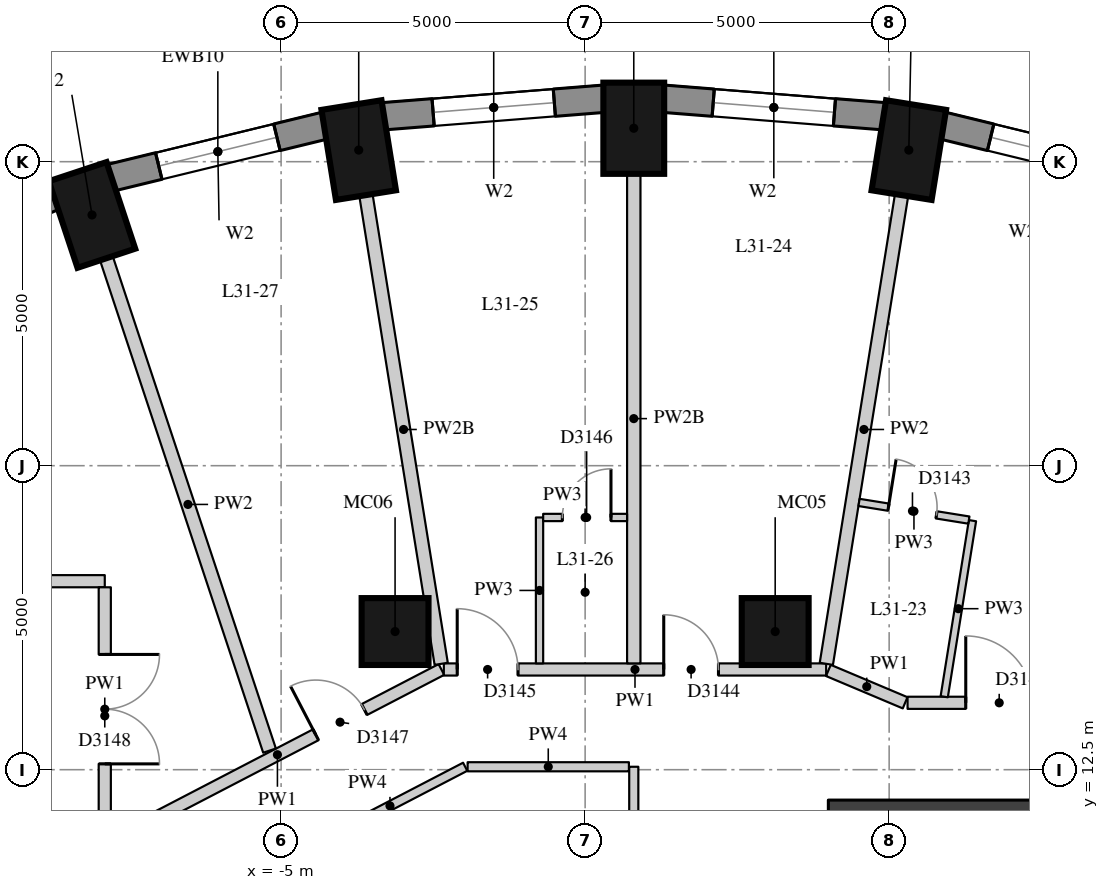
"""IFC4 building model, lengths in metres.
Left out: names, types, materials, properties, quantities, classifications, styles, units other than length and angle.
Written with IfcOpenShell. Run it as: python <this file> out.ifc"""

import sys

from ifc_helpers import new_model, si_unit, direction, frame, frame_2d, origin, origin_2d, place, context, subcontext, project, spatial, rectangle, extrude, element, fill, save


model = new_model("IFC4")
c1 = context("Model", 3, precision=1e-05, world=origin(), true_north=direction((0.0, 1.0)))
c2 = subcontext(c1, "Body", "Model", "MODEL_VIEW")
j1 = project(units=[si_unit("LENGTHUNIT", "METRE"), si_unit("PLANEANGLEUNIT", "RADIAN")], contexts=[c1])
p1 = place(None, origin())
s1 = spatial("IfcSite", under=j1, at=p1, CompositionType="ELEMENT")
p2 = place(p1, origin())
s2 = spatial("IfcBuilding", under=s1, at=p2, CompositionType="ELEMENT")
p3 = place(p2, frame((0.0, 0.0, 112.0)))
s3 = spatial("IfcBuildingStorey", under=s2, at=p3, CompositionType="ELEMENT", Elevation=112.0)
for number, where, z_axis, x_axis in (
    (1, (5.323, 22.691, 0.0), (0.0, 0.0, 1.0), (0.159, 0.987, 0.0)),
    (2, (0.8, 23.05, 0.0), (0.0, 0.0, 1.0), (0.0, 1.0, 0.0)),
    (3, (-3.724, 22.691, 0.0), (0.0, 0.0, 1.0), (-0.159, 0.987, 0.0)),
    (4, (-8.11, 21.624, 0.0), (0.0, 0.0, 1.0), (-0.315, 0.949, 0.0)),
):
    element("IfcColumn", number, at=place(p3, frame(where, z_axis=z_axis, x_axis=x_axis)), inside=s3, PredefinedType="COLUMN", context=c2, shape_type="SweptSolid", body=[
        extrude(rectangle(XDim=1.5, YDim=1.0, at=origin_2d()), origin(), (0.0, 0.0, 1.0), 3.3),
    ])
for number, where, z_axis, x_axis in (
    (5, (3.126, 14.772, 0.0), (0.0, 0.0, 1.0), (1.0, 0.0, 0.0)),
    (6, (-3.126, 14.772, 0.0), (0.0, 0.0, 1.0), (1.0, 0.0, 0.0)),
):
    element("IfcColumn", number, at=place(p3, frame(where, z_axis=z_axis, x_axis=x_axis)), inside=s3, PredefinedType="COLUMN", context=c2, shape_type="SweptSolid", body=[
        extrude(rectangle(XDim=1.1, YDim=1.1, at=origin_2d()), origin(), (0.0, 0.0, 1.0), 3.3),
    ])
p4 = place(p3, frame((9.406, 22.235, 0.0), z_axis=(0.0, 0.0, 1.0), x_axis=(-0.971667603162, 0.236351579148, 0.0)))
e7 = element("IfcWall", 7, at=p4, inside=s3, PredefinedType="SOLIDWALL", context=c2, shape_type="SweptSolid", body=[
    extrude(rectangle(XDim=3.635, YDim=0.45, at=frame_2d((1.817, 0.0))), origin(), (0.0, 0.0, 1.0), 3.02),
])
p5 = place(p4, frame((0.817, 0.0, 0.4)))
e8 = element("IfcOpeningElement", 8, at=p5, cuts=e7, PredefinedType="OPENING", context=c2, shape_type="SweptSolid", body=[
    extrude(rectangle(XDim=2.0, YDim=1.75, at=frame_2d((1.0, 0.875))), frame((0.0, 0.235, 0.0), z_axis=(0.0, -1.0, 0.0), x_axis=(1.0, 0.0, 0.0)), (0.0, 0.0, 1.0), 0.47),
])
p6 = place(p3, frame((4.927, 23.247, 0.0), z_axis=(0.0, 0.0, 1.0), x_axis=(-0.996862216754, 0.079156306178, 0.0)))
e9 = element("IfcWall", 9, at=p6, inside=s3, PredefinedType="SOLIDWALL", context=c2, shape_type="SweptSolid", body=[
    extrude(rectangle(XDim=3.658, YDim=0.45, at=frame_2d((1.829, 0.0))), origin(), (0.0, 0.0, 1.0), 3.02),
])
p7 = place(p6, frame((0.829, 0.0, 0.4)))
e10 = element("IfcOpeningElement", 10, at=p7, cuts=e9, PredefinedType="OPENING", context=c2, shape_type="SweptSolid", body=[
    extrude(rectangle(XDim=2.0, YDim=1.75, at=frame_2d((1.0, 0.875))), frame((0.0, 0.235, 0.0), z_axis=(0.0, -1.0, 0.0), x_axis=(1.0, 0.0, 0.0)), (0.0, 0.0, 1.0), 0.47),
])
p8 = place(p3, frame((0.32, 23.536, 0.0), z_axis=(0.0, 0.0, 1.0), x_axis=(-0.996862216754, -0.079156306178, 0.0)))
e11 = element("IfcWall", 11, at=p8, inside=s3, PredefinedType="SOLIDWALL", context=c2, shape_type="SweptSolid", body=[
    extrude(rectangle(XDim=3.658, YDim=0.45, at=frame_2d((1.829, 0.0))), origin(), (0.0, 0.0, 1.0), 3.02),
])
p9 = place(p8, frame((0.829, 0.0, 0.4)))
e12 = element("IfcOpeningElement", 12, at=p9, cuts=e11, PredefinedType="OPENING", context=c2, shape_type="SweptSolid", body=[
    extrude(rectangle(XDim=2.0, YDim=1.75, at=frame_2d((1.0, 0.875))), frame((0.0, 0.235, 0.0), z_axis=(0.0, -1.0, 0.0), x_axis=(1.0, 0.0, 0.0)), (0.0, 0.0, 1.0), 0.47),
])
p10 = place(p3, frame((-4.275, 23.094, 0.0), z_axis=(0.0, 0.0, 1.0), x_axis=(-0.971667603162, -0.236351579148, 0.0)))
e13 = element("IfcWall", 13, at=p10, inside=s3, PredefinedType="SOLIDWALL", context=c2, shape_type="SweptSolid", body=[
    extrude(rectangle(XDim=3.635, YDim=0.45, at=frame_2d((1.817, 0.0))), origin(), (0.0, 0.0, 1.0), 3.02),
])
p11 = place(p10, frame((0.817, 0.0, 0.4)))
e14 = element("IfcOpeningElement", 14, at=p11, cuts=e13, PredefinedType="OPENING", context=c2, shape_type="SweptSolid", body=[
    extrude(rectangle(XDim=2.0, YDim=1.75, at=frame_2d((1.0, 0.875))), frame((0.0, 0.235, 0.0), z_axis=(0.0, -1.0, 0.0), x_axis=(1.0, 0.0, 0.0)), (0.0, 0.0, 1.0), 0.47),
])
p12 = place(p3, frame((-8.718, 21.934, 0.0), z_axis=(0.0, 0.0, 1.0), x_axis=(-0.920879975612, -0.389846213932, 0.0)))
e15 = element("IfcWall", 15, at=p12, inside=s3, PredefinedType="SOLIDWALL", context=c2, shape_type="SweptSolid", body=[
    extrude(rectangle(XDim=3.592, YDim=0.45, at=frame_2d((1.796, 0.0))), origin(), (0.0, 0.0, 1.0), 3.02),
])
p13 = place(p12, frame((0.796, 0.0, 0.4)))
e16 = element("IfcOpeningElement", 16, at=p13, cuts=e15, PredefinedType="OPENING", context=c2, shape_type="SweptSolid", body=[
    extrude(rectangle(XDim=2.0, YDim=1.75, at=frame_2d((1.0, 0.875))), frame((0.0, 0.235, 0.0), z_axis=(0.0, -1.0, 0.0), x_axis=(1.0, 0.0, 0.0)), (0.0, 0.0, 1.0), 0.47),
])
p14 = place(p3, frame((4.0, 11.55, 0.0), z_axis=(0.0, 0.0, 1.0), x_axis=(1.0, 0.0, 0.0)))
e17 = element("IfcWall", 17, at=p14, inside=s3, PredefinedType="SHEAR", context=c2, shape_type="SweptSolid", body=[
    extrude(rectangle(XDim=15.2, YDim=0.9, at=frame_2d((7.6, 0.0))), origin(), (0.0, 0.0, 1.0), 3.02),
])
p15 = place(p3, frame((-10.509, 15.6, 0.0), z_axis=(0.0, 0.0, 1.0), x_axis=(1.0, 0.0, 0.0)))
e18 = element("IfcWall", 18, at=p15, inside=s3, PredefinedType="PARTITIONING", context=c2, shape_type="SweptSolid", body=[
    extrude(rectangle(XDim=2.609, YDim=0.2, at=frame_2d((1.304, 0.0))), origin(), (0.0, 0.0, 1.0), 3.02),
])
p16 = place(p3, frame((-7.9, 15.5, 0.0), z_axis=(0.0, 0.0, 1.0), x_axis=(0.0, -1.0, 0.0)))
e19 = element("IfcWall", 19, at=p16, inside=s3, PredefinedType="PARTITIONING", context=c2, shape_type="SweptSolid", body=[
    extrude(rectangle(XDim=4.23, YDim=0.2, at=frame_2d((2.115, 0.0))), origin(), (0.0, 0.0, 1.0), 3.02),
])
p17 = place(p16, frame((1.104, 0.0, 0.0)))
e20 = element("IfcOpeningElement", 20, at=p17, cuts=e19, PredefinedType="OPENING", context=c2, shape_type="SweptSolid", body=[
    extrude(rectangle(XDim=1.8, YDim=2.1, at=frame_2d((0.9, 1.05))), frame((0.0, 0.11, 0.0), z_axis=(0.0, -1.0, 0.0), x_axis=(1.0, 0.0, 0.0)), (0.0, 0.0, 1.0), 0.22),
])
p18 = place(p3, frame((-7.757, 11.344, 0.0), z_axis=(0.0, 0.0, 1.0), x_axis=(0.887263483993, 0.461262951008, 0.0)))
e21 = element("IfcWall", 21, at=p18, inside=s3, PredefinedType="PARTITIONING", context=c2, shape_type="SweptSolid", body=[
    extrude(rectangle(XDim=6.079, YDim=0.2, at=frame_2d((3.04, 0.0))), origin(), (0.0, 0.0, 1.0), 3.02),
])
p19 = place(p18, frame((3.75, 0.0, 0.0)))
e22 = element("IfcOpeningElement", 22, at=p19, cuts=e21, PredefinedType="OPENING", context=c2, shape_type="SweptSolid", body=[
    extrude(rectangle(XDim=0.9, YDim=2.1, at=frame_2d((0.45, 1.05))), frame((0.0, 0.11, 0.0), z_axis=(0.0, -1.0, 0.0), x_axis=(1.0, 0.0, 0.0)), (0.0, 0.0, 1.0), 0.22),
])
p20 = place(p3, frame((-2.324, 14.148, 0.0), z_axis=(0.0, 0.0, 1.0), x_axis=(1.0, 0.0, 0.0)))
e23 = element("IfcWall", 23, at=p20, inside=s3, PredefinedType="PARTITIONING", context=c2, shape_type="SweptSolid", body=[
    extrude(rectangle(XDim=6.288, YDim=0.2, at=frame_2d((3.144, 0.0))), origin(), (0.0, 0.0, 1.0), 3.02),
])
p21 = place(p20, frame((3.617, 0.0, 0.0)))
e24 = element("IfcOpeningElement", 24, at=p21, cuts=e23, PredefinedType="OPENING", context=c2, shape_type="SweptSolid", body=[
    extrude(rectangle(XDim=0.9, YDim=2.1, at=frame_2d((0.45, 1.05))), frame((0.0, 0.11, 0.0), z_axis=(0.0, -1.0, 0.0), x_axis=(1.0, 0.0, 0.0)), (0.0, 0.0, 1.0), 0.22),
])
p22 = place(p20, frame((0.22, 0.0, 0.0)))
e25 = element("IfcOpeningElement", 25, at=p22, cuts=e23, PredefinedType="OPENING", context=c2, shape_type="SweptSolid", body=[
    extrude(rectangle(XDim=1.0, YDim=2.1, at=frame_2d((0.5, 1.05))), frame((0.0, 0.11, 0.0), z_axis=(0.0, -1.0, 0.0), x_axis=(1.0, 0.0, 0.0)), (0.0, 0.0, 1.0), 0.22),
])
p23 = place(p3, frame((4.0, 14.133, 0.0), z_axis=(0.0, 0.0, 1.0), x_axis=(0.921370144432, -0.388686322051, 0.0)))
e26 = element("IfcWall", 26, at=p23, inside=s3, PredefinedType="PARTITIONING", context=c2, shape_type="SweptSolid", body=[
    extrude(rectangle(XDim=1.37, YDim=0.2, at=frame_2d((0.685, 0.0))), origin(), (0.0, 0.0, 1.0), 3.02),
])
p24 = place(p3, frame((5.303, 13.6, 0.0), z_axis=(0.0, 0.0, 1.0), x_axis=(1.0, 0.0, 0.0)))
e27 = element("IfcWall", 27, at=p24, inside=s3, PredefinedType="PARTITIONING", context=c2, shape_type="SweptSolid", body=[
    extrude(rectangle(XDim=15.497, YDim=0.2, at=frame_2d((7.749, 0.0))), origin(), (0.0, 0.0, 1.0), 3.02),
])
p25 = place(p24, frame((7.812, 0.0, 0.0)))
e28 = element("IfcOpeningElement", 28, at=p25, cuts=e27, PredefinedType="OPENING", context=c2, shape_type="SweptSolid", body=[
    extrude(rectangle(XDim=1.0, YDim=2.1, at=frame_2d((0.5, 1.05))), frame((0.0, 0.11, 0.0), z_axis=(0.0, -1.0, 0.0), x_axis=(1.0, 0.0, 0.0)), (0.0, 0.0, 1.0), 0.22),
])
p26 = place(p24, frame((0.957, 0.0, 0.0)))
e29 = element("IfcOpeningElement", 29, at=p26, cuts=e27, PredefinedType="OPENING", context=c2, shape_type="SweptSolid", body=[
    extrude(rectangle(XDim=1.1, YDim=2.1, at=frame_2d((0.55, 1.05))), frame((0.0, 0.11, 0.0), z_axis=(0.0, -1.0, 0.0), x_axis=(1.0, 0.0, 0.0)), (0.0, 0.0, 1.0), 0.22),
])
p27 = place(p24, frame((11.467, 0.0, 0.0)))
e30 = element("IfcOpeningElement", 30, at=p27, cuts=e27, PredefinedType="OPENING", context=c2, shape_type="SweptSolid", body=[
    extrude(rectangle(XDim=1.8, YDim=2.1, at=frame_2d((0.9, 1.05))), frame((0.0, 0.11, 0.0), z_axis=(0.0, -1.0, 0.0), x_axis=(1.0, 0.0, 0.0)), (0.0, 0.0, 1.0), 0.22),
])
p28 = place(p3, frame((0.8, 12.548, 0.0), z_axis=(0.0, 0.0, 1.0), x_axis=(0.0, -1.0, 0.0)))
e31 = element("IfcWall", 31, at=p28, inside=s3, PredefinedType="PARTITIONING", context=c2, shape_type="SweptSolid", body=[
    extrude(rectangle(XDim=3.398, YDim=0.15, at=frame_2d((1.699, 0.0))), origin(), (0.0, 0.0, 1.0), 3.02),
])
p29 = place(p3, frame((-4.447, 11.262, 0.0), z_axis=(0.0, 0.0, 1.0), x_axis=(0.887294207503, 0.461203847915, 0.0)))
e32 = element("IfcWall", 32, at=p29, inside=s3, PredefinedType="PARTITIONING", context=c2, shape_type="SweptSolid", body=[
    extrude(rectangle(XDim=2.788, YDim=0.15, at=frame_2d((1.394, 0.0))), origin(), (0.0, 0.0, 1.0), 3.02),
])
p30 = place(p3, frame((-1.933, 12.548, 0.0), z_axis=(0.0, 0.0, 1.0), x_axis=(1.0, 0.0, 0.0)))
e33 = element("IfcWall", 33, at=p30, inside=s3, PredefinedType="PARTITIONING", context=c2, shape_type="SweptSolid", body=[
    extrude(rectangle(XDim=2.653, YDim=0.15, at=frame_2d((1.326, 0.0))), origin(), (0.0, 0.0, 1.0), 3.02),
])
p31 = place(p3, frame((5.205, 21.95, 0.0), z_axis=(0.0, 0.0, 1.0), x_axis=(-0.158499016873, -0.987359135092, 0.0)))
e34 = element("IfcWall", 34, at=p31, inside=s3, PredefinedType="PARTITIONING", context=c2, shape_type="SweptSolid", body=[
    extrude(rectangle(XDim=7.808, YDim=0.22, at=frame_2d((3.904, 0.0))), origin(), (0.0, 0.0, 1.0), 3.02),
])
p32 = place(p3, frame((0.8, 22.3, 0.0), z_axis=(0.0, 0.0, 1.0), x_axis=(0.0, -1.0, 0.0)))
e35 = element("IfcWall", 35, at=p32, inside=s3, PredefinedType="PARTITIONING", context=c2, shape_type="SweptSolid", body=[
    extrude(rectangle(XDim=8.052, YDim=0.22, at=frame_2d((4.026, 0.0))), origin(), (0.0, 0.0, 1.0), 2.57),
])
p33 = place(p3, frame((-3.605, 21.95, 0.0), z_axis=(0.0, 0.0, 1.0), x_axis=(0.158529499426, -0.987354241299, 0.0)))
e36 = element("IfcWall", 36, at=p33, inside=s3, PredefinedType="PARTITIONING", context=c2, shape_type="SweptSolid", body=[
    extrude(rectangle(XDim=7.808, YDim=0.22, at=frame_2d((3.904, 0.0))), origin(), (0.0, 0.0, 1.0), 2.57),
])
p34 = place(p3, frame((-7.874, 20.912, 0.0), z_axis=(0.0, 0.0, 1.0), x_axis=(0.314561749761, -0.949237012335, 0.0)))
e37 = element("IfcWall", 37, at=p34, inside=s3, PredefinedType="PARTITIONING", context=c2, shape_type="SweptSolid", body=[
    extrude(rectangle(XDim=8.531, YDim=0.22, at=frame_2d((4.266, 0.0))), origin(), (0.0, 0.0, 1.0), 3.02),
])
p35 = place(p3, frame((5.906, 13.7, 0.0), z_axis=(0.0, 0.0, 1.0), x_axis=(0.158509986532, 0.98735737409, 0.0)))
e38 = element("IfcWall", 38, at=p35, inside=s3, PredefinedType="PARTITIONING", context=c2, shape_type="SweptSolid", body=[
    extrude(rectangle(XDim=2.933, YDim=0.12, at=frame_2d((1.466, 0.0))), origin(), (0.0, 0.0, 1.0), 3.02),
])
p36 = place(p3, frame((-0.75, 14.248, 0.0), z_axis=(0.0, 0.0, 1.0), x_axis=(0.0, 1.0, 0.0)))
e39 = element("IfcWall", 39, at=p36, inside=s3, PredefinedType="PARTITIONING", context=c2, shape_type="SweptSolid", body=[
    extrude(rectangle(XDim=2.4, YDim=0.12, at=frame_2d((1.2, 0.0))), origin(), (0.0, 0.0, 1.0), 3.02),
])
p37 = place(p3, frame((6.311, 16.605, 0.0), z_axis=(0.0, 0.0, 1.0), x_axis=(-0.987336342922, 0.158640934018, 0.0)))
e40 = element("IfcWall", 40, at=p37, inside=s3, PredefinedType="PARTITIONING", context=c2, shape_type="SweptSolid", body=[
    extrude(rectangle(XDim=1.83, YDim=0.12, at=frame_2d((0.915, 0.0))), origin(), (0.0, 0.0, 1.0), 3.02),
])
p38 = place(p37, frame((0.54, 0.0, 0.0)))
e41 = element("IfcOpeningElement", 41, at=p38, cuts=e40, PredefinedType="OPENING", context=c2, shape_type="SweptSolid", body=[
    extrude(rectangle(XDim=0.8, YDim=2.1, at=frame_2d((0.4, 1.05))), frame((0.0, 0.07, 0.0), z_axis=(0.0, -1.0, 0.0), x_axis=(1.0, 0.0, 0.0)), (0.0, 0.0, 1.0), 0.14),
])
p39 = place(p3, frame((-0.69, 16.648, 0.0), z_axis=(0.0, 0.0, 1.0), x_axis=(1.0, 0.0, 0.0)))
e42 = element("IfcWall", 42, at=p39, inside=s3, PredefinedType="PARTITIONING", context=c2, shape_type="SweptSolid", body=[
    extrude(rectangle(XDim=1.38, YDim=0.12, at=frame_2d((0.69, 0.0))), origin(), (0.0, 0.0, 1.0), 3.02),
])
p40 = place(p39, frame((0.315, 0.0, 0.0)))
e43 = element("IfcOpeningElement", 43, at=p40, cuts=e42, PredefinedType="OPENING", context=c2, shape_type="SweptSolid", body=[
    extrude(rectangle(XDim=0.8, YDim=2.1, at=frame_2d((0.4, 1.05))), frame((0.0, 0.07, 0.0), z_axis=(0.0, -1.0, 0.0), x_axis=(1.0, 0.0, 0.0)), (0.0, 0.0, 1.0), 0.14),
])
p41 = place(p5, origin())
e44 = element("IfcWindow", 44, at=p41, inside=s3, PartitioningType="SINGLE_PANEL", PredefinedType="WINDOW", context=c2, shape_type="SweptSolid", body=[
    extrude(rectangle(XDim=2.0, YDim=1.75, at=frame_2d((1.0, 0.875))), frame((0.0, 0.035, 0.0), z_axis=(0.0, -1.0, 0.0), x_axis=(1.0, 0.0, 0.0)), (0.0, 0.0, 1.0), 0.06),
])
fill(e8, e44)
p42 = place(p7, origin())
e45 = element("IfcWindow", 45, at=p42, inside=s3, PartitioningType="SINGLE_PANEL", PredefinedType="WINDOW", context=c2, shape_type="SweptSolid", body=[
    extrude(rectangle(XDim=2.0, YDim=1.75, at=frame_2d((1.0, 0.875))), frame((0.0, 0.035, 0.0), z_axis=(0.0, -1.0, 0.0), x_axis=(1.0, 0.0, 0.0)), (0.0, 0.0, 1.0), 0.06),
])
fill(e10, e45)
p43 = place(p9, origin())
e46 = element("IfcWindow", 46, at=p43, inside=s3, PartitioningType="SINGLE_PANEL", PredefinedType="WINDOW", context=c2, shape_type="SweptSolid", body=[
    extrude(rectangle(XDim=2.0, YDim=1.75, at=frame_2d((1.0, 0.875))), frame((0.0, 0.035, 0.0), z_axis=(0.0, -1.0, 0.0), x_axis=(1.0, 0.0, 0.0)), (0.0, 0.0, 1.0), 0.06),
])
fill(e12, e46)
p44 = place(p11, origin())
e47 = element("IfcWindow", 47, at=p44, inside=s3, PartitioningType="SINGLE_PANEL", PredefinedType="WINDOW", context=c2, shape_type="SweptSolid", body=[
    extrude(rectangle(XDim=2.0, YDim=1.75, at=frame_2d((1.0, 0.875))), frame((0.0, 0.035, 0.0), z_axis=(0.0, -1.0, 0.0), x_axis=(1.0, 0.0, 0.0)), (0.0, 0.0, 1.0), 0.06),
])
fill(e14, e47)
p45 = place(p26, origin())
e48 = element("IfcDoor", 48, at=p45, inside=s3, OperationType="SINGLE_SWING_LEFT", PredefinedType="DOOR", context=c2, shape_type="SweptSolid", body=[
    extrude(rectangle(XDim=1.1, YDim=2.1, at=frame_2d((0.55, 1.05))), frame((0.0, 0.025, 0.0), z_axis=(0.0, -1.0, 0.0), x_axis=(1.0, 0.0, 0.0)), (0.0, 0.0, 1.0), 0.05),
])
fill(e29, e48)
p46 = place(p38, origin())
e49 = element("IfcDoor", 49, at=p46, inside=s3, OperationType="SINGLE_SWING_LEFT", PredefinedType="DOOR", context=c2, shape_type="SweptSolid", body=[
    extrude(rectangle(XDim=0.8, YDim=2.1, at=frame_2d((0.4, 1.05))), frame((0.0, 0.025, 0.0), z_axis=(0.0, -1.0, 0.0), x_axis=(1.0, 0.0, 0.0)), (0.0, 0.0, 1.0), 0.05),
])
fill(e41, e49)
p47 = place(p21, origin())
e50 = element("IfcDoor", 50, at=p47, inside=s3, OperationType="SINGLE_SWING_LEFT", PredefinedType="DOOR", context=c2, shape_type="SweptSolid", body=[
    extrude(rectangle(XDim=0.9, YDim=2.1, at=frame_2d((0.45, 1.05))), frame((0.0, 0.025, 0.0), z_axis=(0.0, -1.0, 0.0), x_axis=(1.0, 0.0, 0.0)), (0.0, 0.0, 1.0), 0.05),
])
fill(e24, e50)
p48 = place(p22, origin())
e51 = element("IfcDoor", 51, at=p48, inside=s3, OperationType="SINGLE_SWING_LEFT", PredefinedType="DOOR", context=c2, shape_type="SweptSolid", body=[
    extrude(rectangle(XDim=1.0, YDim=2.1, at=frame_2d((0.5, 1.05))), frame((0.0, 0.025, 0.0), z_axis=(0.0, -1.0, 0.0), x_axis=(1.0, 0.0, 0.0)), (0.0, 0.0, 1.0), 0.05),
])
fill(e25, e51)
p49 = place(p40, origin())
e52 = element("IfcDoor", 52, at=p49, inside=s3, OperationType="SINGLE_SWING_RIGHT", PredefinedType="DOOR", context=c2, shape_type="SweptSolid", body=[
    extrude(rectangle(XDim=0.8, YDim=2.1, at=frame_2d((0.4, 1.05))), frame((0.0, 0.025, 0.0), z_axis=(0.0, -1.0, 0.0), x_axis=(1.0, 0.0, 0.0)), (0.0, 0.0, 1.0), 0.05),
])
fill(e43, e52)
p50 = place(p19, origin())
e53 = element("IfcDoor", 53, at=p50, inside=s3, OperationType="SINGLE_SWING_LEFT", PredefinedType="DOOR", context=c2, shape_type="SweptSolid", body=[
    extrude(rectangle(XDim=0.9, YDim=2.1, at=frame_2d((0.45, 1.05))), frame((0.0, 0.025, 0.0), z_axis=(0.0, -1.0, 0.0), x_axis=(1.0, 0.0, 0.0)), (0.0, 0.0, 1.0), 0.05),
])
fill(e22, e53)
p51 = place(p17, origin())
e54 = element("IfcDoor", 54, at=p51, inside=s3, OperationType="DOUBLE_DOOR_SINGLE_SWING", PredefinedType="DOOR", context=c2, shape_type="SweptSolid", body=[
    extrude(rectangle(XDim=1.8, YDim=2.1, at=frame_2d((0.9, 1.05))), frame((0.0, 0.025, 0.0), z_axis=(0.0, -1.0, 0.0), x_axis=(1.0, 0.0, 0.0)), (0.0, 0.0, 1.0), 0.05),
])
fill(e20, e54)
save(model, sys.argv[1])
